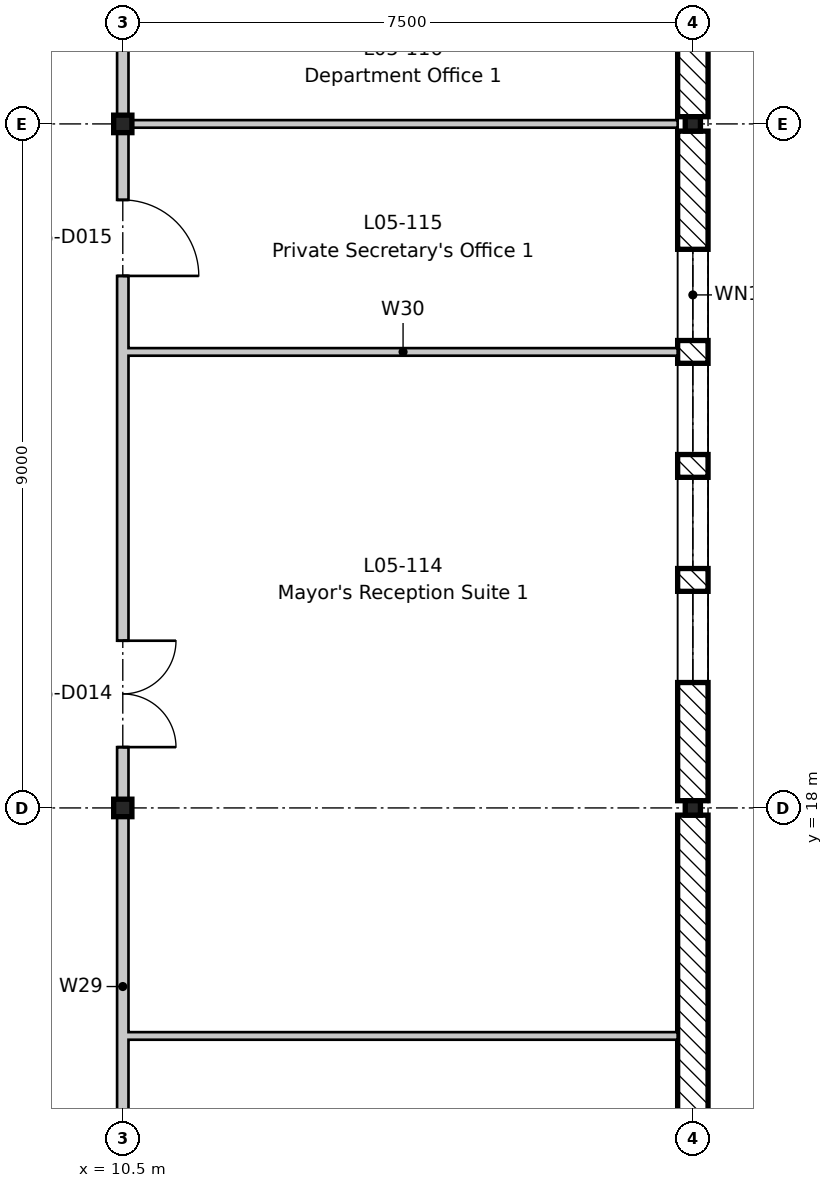
"""IFC4 building model, lengths in metres.
Left out: names, types, materials, properties, quantities, classifications, styles, units other than length and angle.
Written with IfcOpenShell. Run it as: python <this file> out.ifc"""

import sys

from ifc_helpers import new_model, si_unit, direction, frame, frame_2d, origin, origin_2d, place, context, subcontext, project, spatial, rectangle, i_section, extrude, element, fill, save


model = new_model("IFC4")
c1 = context("Model", 3, precision=1e-05, world=origin(), true_north=direction((0.0, 1.0)))
c2 = subcontext(c1, "Body", "Model", "MODEL_VIEW")
j1 = project(units=[si_unit("LENGTHUNIT", "METRE"), si_unit("PLANEANGLEUNIT", "RADIAN")], contexts=[c1])
p1 = place(None, origin())
s1 = spatial("IfcSite", under=j1, at=p1, CompositionType="ELEMENT")
p2 = place(p1, origin())
s2 = spatial("IfcBuilding", under=s1, at=p2, CompositionType="ELEMENT")
p3 = place(p2, frame((0.0, 0.0, 22.8)))
s3 = spatial("IfcBuildingStorey", under=s2, at=p3, CompositionType="ELEMENT", Elevation=22.8)
for number, where, z_axis, x_axis in (
    (1, (10.5, 18.0, -0.2), (0.0, 0.0, 1.0), (1.0, 0.0, 0.0)),
    (2, (10.5, 27.0, -0.2), (0.0, 0.0, 1.0), (1.0, 0.0, 0.0)),
):
    element("IfcColumn", number, at=place(p3, frame(where, z_axis=z_axis, x_axis=x_axis)), inside=s3, PredefinedType="COLUMN", context=c2, shape_type="SweptSolid", body=[
        extrude(i_section(OverallWidth=0.24, OverallDepth=0.23, WebThickness=0.008, FlangeThickness=0.012, FilletRadius=0.021, at=origin_2d()), origin(), (0.0, 0.0, 1.0), 4.15),
    ])
for number, where, z_axis, x_axis in (
    (3, (18.0, 18.0, -0.2), (0.0, 0.0, 1.0), (1.0, 0.0, 0.0)),
    (4, (18.0, 27.0, -0.2), (0.0, 0.0, 1.0), (1.0, 0.0, 0.0)),
):
    element("IfcColumn", number, at=place(p3, frame(where, z_axis=z_axis, x_axis=x_axis)), inside=s3, PredefinedType="COLUMN", context=c2, shape_type="SweptSolid", body=[
        extrude(i_section(OverallWidth=0.2, OverallDepth=0.19, WebThickness=0.007, FlangeThickness=0.01, FilletRadius=0.018, at=origin_2d()), origin(), (0.0, 0.0, 1.0), 4.15),
    ])
p4 = place(p3, frame((18.0, 17.905, 0.0), z_axis=(0.0, 0.0, 1.0), x_axis=(0.0, -1.0, 0.0)))
e5 = element("IfcWall", 5, at=p4, inside=s3, PredefinedType="STANDARD", context=c2, shape_type="SweptSolid", body=[
    extrude(rectangle(XDim=8.81, YDim=0.4, at=frame_2d((4.405, 0.0))), origin(), (0.0, 0.0, 1.0), 3.55),
])
p5 = place(p3, frame((18.0, 26.905, 0.0), z_axis=(0.0, 0.0, 1.0), x_axis=(0.0, -1.0, 0.0)))
e6 = element("IfcWall", 6, at=p5, inside=s3, PredefinedType="STANDARD", context=c2, shape_type="SweptSolid", body=[
    extrude(rectangle(XDim=8.81, YDim=0.4, at=frame_2d((4.405, 0.0))), origin(), (0.0, 0.0, 1.0), 3.55),
])
p6 = place(p5, frame((6.055, 0.0, 0.6)))
e7 = element("IfcOpeningElement", 7, at=p6, cuts=e6, PredefinedType="OPENING", context=c2, shape_type="SweptSolid", body=[
    extrude(rectangle(XDim=1.2, YDim=1.8, at=frame_2d((0.6, 0.9))), frame((0.0, 0.21, 0.0), z_axis=(0.0, -1.0, 0.0), x_axis=(1.0, 0.0, 0.0)), (0.0, 0.0, 1.0), 0.42),
])
p7 = place(p5, frame((4.555, 0.0, 0.6)))
e8 = element("IfcOpeningElement", 8, at=p7, cuts=e6, PredefinedType="OPENING", context=c2, shape_type="SweptSolid", body=[
    extrude(rectangle(XDim=1.2, YDim=1.8, at=frame_2d((0.6, 0.9))), frame((0.0, 0.21, 0.0), z_axis=(0.0, -1.0, 0.0), x_axis=(1.0, 0.0, 0.0)), (0.0, 0.0, 1.0), 0.42),
])
p8 = place(p5, frame((3.055, 0.0, 0.6)))
e9 = element("IfcOpeningElement", 9, at=p8, cuts=e6, PredefinedType="OPENING", context=c2, shape_type="SweptSolid", body=[
    extrude(rectangle(XDim=1.2, YDim=1.8, at=frame_2d((0.6, 0.9))), frame((0.0, 0.21, 0.0), z_axis=(0.0, -1.0, 0.0), x_axis=(1.0, 0.0, 0.0)), (0.0, 0.0, 1.0), 0.42),
])
p9 = place(p5, frame((1.555, 0.0, 0.6)))
e10 = element("IfcOpeningElement", 10, at=p9, cuts=e6, PredefinedType="OPENING", context=c2, shape_type="SweptSolid", body=[
    extrude(rectangle(XDim=1.2, YDim=1.8, at=frame_2d((0.6, 0.9))), frame((0.0, 0.21, 0.0), z_axis=(0.0, -1.0, 0.0), x_axis=(1.0, 0.0, 0.0)), (0.0, 0.0, 1.0), 0.42),
])
p10 = place(p3, frame((18.0, 35.905, 0.0), z_axis=(0.0, 0.0, 1.0), x_axis=(0.0, -1.0, 0.0)))
e11 = element("IfcWall", 11, at=p10, inside=s3, PredefinedType="STANDARD", context=c2, shape_type="SweptSolid", body=[
    extrude(rectangle(XDim=8.81, YDim=0.4, at=frame_2d((4.405, 0.0))), origin(), (0.0, 0.0, 1.0), 3.55),
])
p11 = place(p10, frame((6.055, 0.0, 0.6)))
e12 = element("IfcOpeningElement", 12, at=p11, cuts=e11, PredefinedType="OPENING", context=c2, shape_type="SweptSolid", body=[
    extrude(rectangle(XDim=1.2, YDim=1.8, at=frame_2d((0.6, 0.9))), frame((0.0, 0.21, 0.0), z_axis=(0.0, -1.0, 0.0), x_axis=(1.0, 0.0, 0.0)), (0.0, 0.0, 1.0), 0.42),
])
p12 = place(p10, frame((4.555, 0.0, 0.6)))
e13 = element("IfcOpeningElement", 13, at=p12, cuts=e11, PredefinedType="OPENING", context=c2, shape_type="SweptSolid", body=[
    extrude(rectangle(XDim=1.2, YDim=1.8, at=frame_2d((0.6, 0.9))), frame((0.0, 0.21, 0.0), z_axis=(0.0, -1.0, 0.0), x_axis=(1.0, 0.0, 0.0)), (0.0, 0.0, 1.0), 0.42),
])
p13 = place(p10, frame((3.055, 0.0, 0.6)))
e14 = element("IfcOpeningElement", 14, at=p13, cuts=e11, PredefinedType="OPENING", context=c2, shape_type="SweptSolid", body=[
    extrude(rectangle(XDim=1.2, YDim=1.8, at=frame_2d((0.6, 0.9))), frame((0.0, 0.21, 0.0), z_axis=(0.0, -1.0, 0.0), x_axis=(1.0, 0.0, 0.0)), (0.0, 0.0, 1.0), 0.42),
])
p14 = place(p10, frame((1.555, 0.0, 0.6)))
e15 = element("IfcOpeningElement", 15, at=p14, cuts=e11, PredefinedType="OPENING", context=c2, shape_type="SweptSolid", body=[
    extrude(rectangle(XDim=1.2, YDim=1.8, at=frame_2d((0.6, 0.9))), frame((0.0, 0.21, 0.0), z_axis=(0.0, -1.0, 0.0), x_axis=(1.0, 0.0, 0.0)), (0.0, 0.0, 1.0), 0.42),
])
for number, where, z_axis, x_axis in (
    (16, (10.575, 15.0, 0.0), (0.0, 0.0, 1.0), (1.0, 0.0, 0.0)),
    (17, (10.575, 24.0, 0.0), (0.0, 0.0, 1.0), (1.0, 0.0, 0.0)),
):
    element("IfcWall", number, at=place(p3, frame(where, z_axis=z_axis, x_axis=x_axis)), inside=s3, PredefinedType="PARTITIONING", context=c2, shape_type="SweptSolid", body=[
        extrude(rectangle(XDim=7.225, YDim=0.1, at=frame_2d((3.613, 0.0))), origin(), (0.0, 0.0, 1.0), 3.95),
    ])
p15 = place(p3, frame((10.575, 27.0, 0.0), z_axis=(0.0, 0.0, 1.0), x_axis=(1.0, 0.0, 0.0)))
e18 = element("IfcWall", 18, at=p15, inside=s3, PredefinedType="PARTITIONING", context=c2, shape_type="SweptSolid", body=[
    extrude(rectangle(XDim=7.225, YDim=0.1, at=frame_2d((3.613, 0.0))), origin(), (0.0, 0.0, 1.0), 3.6),
])
p16 = place(p3, frame((10.5, -8.8, 0.0), z_axis=(0.0, 0.0, 1.0), x_axis=(0.0, 1.0, 0.0)))
e19 = element("IfcWall", 19, at=p16, inside=s3, PredefinedType="PARTITIONING", context=c2, shape_type="SweptSolid", body=[
    extrude(rectangle(XDim=79.3, YDim=0.15, at=frame_2d((39.65, 0.0))), origin(), (0.0, 0.0, 1.0), 3.43),
])
p17 = place(p16, frame((3.6, 0.0, 0.0)))
e20 = element("IfcOpeningElement", 20, at=p17, cuts=e19, PredefinedType="OPENING", context=c2, shape_type="SweptSolid", body=[
    extrude(rectangle(XDim=1.4, YDim=2.1, at=frame_2d((0.7, 1.05))), frame((0.0, 0.085, 0.0), z_axis=(0.0, -1.0, 0.0), x_axis=(1.0, 0.0, 0.0)), (0.0, 0.0, 1.0), 0.17),
])
p18 = place(p16, frame((9.8, 0.0, 0.0)))
e21 = element("IfcOpeningElement", 21, at=p18, cuts=e19, PredefinedType="OPENING", context=c2, shape_type="SweptSolid", body=[
    extrude(rectangle(XDim=1.0, YDim=2.1, at=frame_2d((0.5, 1.05))), frame((0.0, 0.085, 0.0), z_axis=(0.0, -1.0, 0.0), x_axis=(1.0, 0.0, 0.0)), (0.0, 0.0, 1.0), 0.17),
])
p19 = place(p16, frame((14.3, 0.0, 0.0)))
e22 = element("IfcOpeningElement", 22, at=p19, cuts=e19, PredefinedType="OPENING", context=c2, shape_type="SweptSolid", body=[
    extrude(rectangle(XDim=1.0, YDim=2.1, at=frame_2d((0.5, 1.05))), frame((0.0, 0.085, 0.0), z_axis=(0.0, -1.0, 0.0), x_axis=(1.0, 0.0, 0.0)), (0.0, 0.0, 1.0), 0.17),
])
p20 = place(p16, frame((20.3, 0.0, 0.0)))
e23 = element("IfcOpeningElement", 23, at=p20, cuts=e19, PredefinedType="OPENING", context=c2, shape_type="SweptSolid", body=[
    extrude(rectangle(XDim=1.0, YDim=2.1, at=frame_2d((0.5, 1.05))), frame((0.0, 0.085, 0.0), z_axis=(0.0, -1.0, 0.0), x_axis=(1.0, 0.0, 0.0)), (0.0, 0.0, 1.0), 0.17),
])
p21 = place(p16, frame((27.6, 0.0, 0.0)))
e24 = element("IfcOpeningElement", 24, at=p21, cuts=e19, PredefinedType="OPENING", context=c2, shape_type="SweptSolid", body=[
    extrude(rectangle(XDim=1.4, YDim=2.1, at=frame_2d((0.7, 1.05))), frame((0.0, 0.085, 0.0), z_axis=(0.0, -1.0, 0.0), x_axis=(1.0, 0.0, 0.0)), (0.0, 0.0, 1.0), 0.17),
])
p22 = place(p16, frame((33.8, 0.0, 0.0)))
e25 = element("IfcOpeningElement", 25, at=p22, cuts=e19, PredefinedType="OPENING", context=c2, shape_type="SweptSolid", body=[
    extrude(rectangle(XDim=1.0, YDim=2.1, at=frame_2d((0.5, 1.05))), frame((0.0, 0.085, 0.0), z_axis=(0.0, -1.0, 0.0), x_axis=(1.0, 0.0, 0.0)), (0.0, 0.0, 1.0), 0.17),
])
p23 = place(p16, frame((36.8, 0.0, 0.0)))
e26 = element("IfcOpeningElement", 26, at=p23, cuts=e19, PredefinedType="OPENING", context=c2, shape_type="SweptSolid", body=[
    extrude(rectangle(XDim=1.0, YDim=2.1, at=frame_2d((0.5, 1.05))), frame((0.0, 0.085, 0.0), z_axis=(0.0, -1.0, 0.0), x_axis=(1.0, 0.0, 0.0)), (0.0, 0.0, 1.0), 0.17),
])
p24 = place(p16, frame((39.8, 0.0, 0.0)))
e27 = element("IfcOpeningElement", 27, at=p24, cuts=e19, PredefinedType="OPENING", context=c2, shape_type="SweptSolid", body=[
    extrude(rectangle(XDim=1.0, YDim=2.1, at=frame_2d((0.5, 1.05))), frame((0.0, 0.085, 0.0), z_axis=(0.0, -1.0, 0.0), x_axis=(1.0, 0.0, 0.0)), (0.0, 0.0, 1.0), 0.17),
])
p25 = place(p16, frame((45.55, 0.0, 0.0)))
e28 = element("IfcOpeningElement", 28, at=p25, cuts=e19, PredefinedType="OPENING", context=c2, shape_type="SweptSolid", body=[
    extrude(rectangle(XDim=1.0, YDim=2.1, at=frame_2d((0.5, 1.05))), frame((0.0, 0.085, 0.0), z_axis=(0.0, -1.0, 0.0), x_axis=(1.0, 0.0, 0.0)), (0.0, 0.0, 1.0), 0.17),
])
p26 = place(p16, frame((48.8, 0.0, 0.0)))
e29 = element("IfcOpeningElement", 29, at=p26, cuts=e19, PredefinedType="OPENING", context=c2, shape_type="SweptSolid", body=[
    extrude(rectangle(XDim=1.0, YDim=2.1, at=frame_2d((0.5, 1.05))), frame((0.0, 0.085, 0.0), z_axis=(0.0, -1.0, 0.0), x_axis=(1.0, 0.0, 0.0)), (0.0, 0.0, 1.0), 0.17),
])
p27 = place(p16, frame((51.8, 0.0, 0.0)))
e30 = element("IfcOpeningElement", 30, at=p27, cuts=e19, PredefinedType="OPENING", context=c2, shape_type="SweptSolid", body=[
    extrude(rectangle(XDim=1.0, YDim=2.1, at=frame_2d((0.5, 1.05))), frame((0.0, 0.085, 0.0), z_axis=(0.0, -1.0, 0.0), x_axis=(1.0, 0.0, 0.0)), (0.0, 0.0, 1.0), 0.17),
])
p28 = place(p16, frame((57.6, 0.0, 0.0)))
e31 = element("IfcOpeningElement", 31, at=p28, cuts=e19, PredefinedType="OPENING", context=c2, shape_type="SweptSolid", body=[
    extrude(rectangle(XDim=1.4, YDim=2.1, at=frame_2d((0.7, 1.05))), frame((0.0, 0.085, 0.0), z_axis=(0.0, -1.0, 0.0), x_axis=(1.0, 0.0, 0.0)), (0.0, 0.0, 1.0), 0.17),
])
p29 = place(p16, frame((65.3, 0.0, 0.0)))
e32 = element("IfcOpeningElement", 32, at=p29, cuts=e19, PredefinedType="OPENING", context=c2, shape_type="SweptSolid", body=[
    extrude(rectangle(XDim=1.0, YDim=2.1, at=frame_2d((0.5, 1.05))), frame((0.0, 0.085, 0.0), z_axis=(0.0, -1.0, 0.0), x_axis=(1.0, 0.0, 0.0)), (0.0, 0.0, 1.0), 0.17),
])
p30 = place(p16, frame((69.8, 0.0, 0.0)))
e33 = element("IfcOpeningElement", 33, at=p30, cuts=e19, PredefinedType="OPENING", context=c2, shape_type="SweptSolid", body=[
    extrude(rectangle(XDim=1.0, YDim=2.1, at=frame_2d((0.5, 1.05))), frame((0.0, 0.085, 0.0), z_axis=(0.0, -1.0, 0.0), x_axis=(1.0, 0.0, 0.0)), (0.0, 0.0, 1.0), 0.17),
])
p31 = place(p16, frame((72.8, 0.0, 0.0)))
e34 = element("IfcOpeningElement", 34, at=p31, cuts=e19, PredefinedType="OPENING", context=c2, shape_type="SweptSolid", body=[
    extrude(rectangle(XDim=1.0, YDim=2.1, at=frame_2d((0.5, 1.05))), frame((0.0, 0.085, 0.0), z_axis=(0.0, -1.0, 0.0), x_axis=(1.0, 0.0, 0.0)), (0.0, 0.0, 1.0), 0.17),
])
p32 = place(p6, origin())
e35 = element("IfcWindow", 35, at=p32, inside=s3, PartitioningType="SINGLE_PANEL", PredefinedType="WINDOW", context=c2, shape_type="SweptSolid", body=[
    extrude(rectangle(XDim=1.2, YDim=1.8, at=frame_2d((0.6, 0.9))), frame((0.0, 0.03, 0.0), z_axis=(0.0, -1.0, 0.0), x_axis=(1.0, 0.0, 0.0)), (0.0, 0.0, 1.0), 0.06),
])
fill(e7, e35)
p33 = place(p7, origin())
e36 = element("IfcWindow", 36, at=p33, inside=s3, PartitioningType="SINGLE_PANEL", PredefinedType="WINDOW", context=c2, shape_type="SweptSolid", body=[
    extrude(rectangle(XDim=1.2, YDim=1.8, at=frame_2d((0.6, 0.9))), frame((0.0, 0.03, 0.0), z_axis=(0.0, -1.0, 0.0), x_axis=(1.0, 0.0, 0.0)), (0.0, 0.0, 1.0), 0.06),
])
fill(e8, e36)
p34 = place(p8, origin())
e37 = element("IfcWindow", 37, at=p34, inside=s3, PartitioningType="SINGLE_PANEL", PredefinedType="WINDOW", context=c2, shape_type="SweptSolid", body=[
    extrude(rectangle(XDim=1.2, YDim=1.8, at=frame_2d((0.6, 0.9))), frame((0.0, 0.03, 0.0), z_axis=(0.0, -1.0, 0.0), x_axis=(1.0, 0.0, 0.0)), (0.0, 0.0, 1.0), 0.06),
])
fill(e9, e37)
p35 = place(p9, origin())
e38 = element("IfcWindow", 38, at=p35, inside=s3, PartitioningType="SINGLE_PANEL", PredefinedType="WINDOW", context=c2, shape_type="SweptSolid", body=[
    extrude(rectangle(XDim=1.2, YDim=1.8, at=frame_2d((0.6, 0.9))), frame((0.0, 0.03, 0.0), z_axis=(0.0, -1.0, 0.0), x_axis=(1.0, 0.0, 0.0)), (0.0, 0.0, 1.0), 0.06),
])
fill(e10, e38)
p36 = place(p21, frame((1.4, 0.0, 0.0), z_axis=(0.0, 0.0, 1.0), x_axis=(-1.0, 0.0, 0.0)))
e39 = element("IfcDoor", 39, at=p36, inside=s3, OperationType="DOUBLE_DOOR_SINGLE_SWING", PredefinedType="DOOR", context=c2, shape_type="SweptSolid", body=[
    extrude(rectangle(XDim=1.4, YDim=2.1, at=frame_2d((0.7, 1.05))), frame((0.0, 0.025, 0.0), z_axis=(0.0, -1.0, 0.0), x_axis=(1.0, 0.0, 0.0)), (0.0, 0.0, 1.0), 0.05),
])
fill(e24, e39)
p37 = place(p22, frame((1.0, 0.0, 0.0), z_axis=(0.0, 0.0, 1.0), x_axis=(-1.0, 0.0, 0.0)))
e40 = element("IfcDoor", 40, at=p37, inside=s3, OperationType="SINGLE_SWING_RIGHT", PredefinedType="DOOR", context=c2, shape_type="SweptSolid", body=[
    extrude(rectangle(XDim=1.0, YDim=2.1, at=frame_2d((0.5, 1.05))), frame((0.0, 0.025, 0.0), z_axis=(0.0, -1.0, 0.0), x_axis=(1.0, 0.0, 0.0)), (0.0, 0.0, 1.0), 0.05),
])
fill(e25, e40)
save(model, sys.argv[1])
